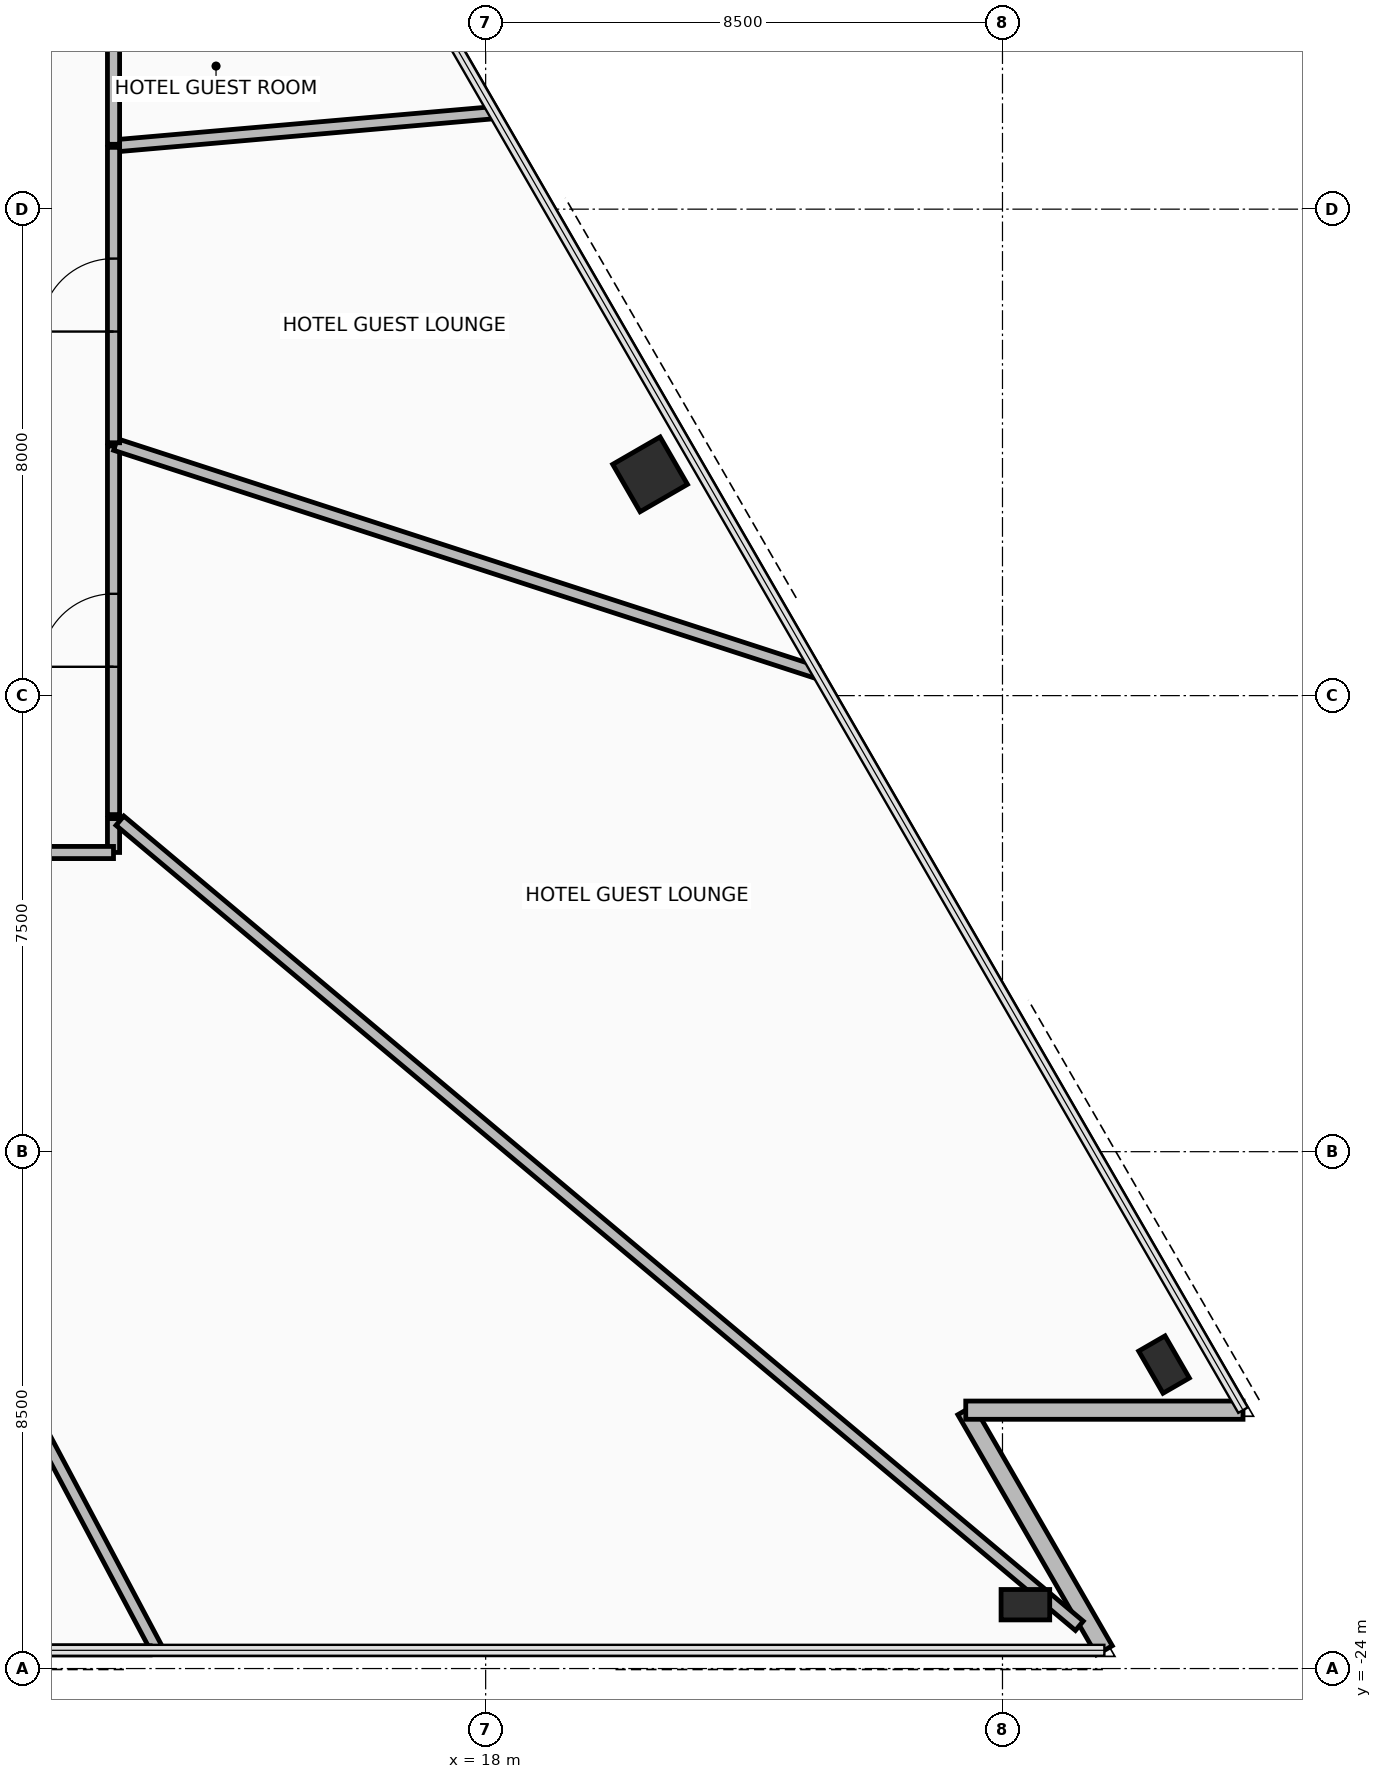
"""IFC4 building model, lengths in metres.
Left out: names, types, materials, properties, quantities, classifications, styles, units other than length and angle.
Written with IfcOpenShell. Run it as: python <this file> out.ifc"""

import sys

from ifc_helpers import new_model, si_unit, direction, frame, frame_2d, origin, origin_2d, place, context, subcontext, project, spatial, rectangle, hollow_rectangle, extrude, element, fill, save


model = new_model("IFC4")
c1 = context("Model", 3, precision=1e-05, world=origin(), true_north=direction((0.0, 1.0)))
c2 = subcontext(c1, "Body", "Model", "MODEL_VIEW")
j1 = project(units=[si_unit("LENGTHUNIT", "METRE"), si_unit("PLANEANGLEUNIT", "RADIAN")], contexts=[c1])
p1 = place(None, origin())
s1 = spatial("IfcSite", under=j1, at=p1, CompositionType="ELEMENT")
p2 = place(p1, origin())
s2 = spatial("IfcBuilding", under=s1, at=p2, CompositionType="ELEMENT")
p3 = place(p2, frame((0.0, 0.0, 38.65)))
s3 = spatial("IfcBuildingStorey", under=s2, at=p3, CompositionType="ELEMENT", Elevation=38.65)
for number, where, z_axis, x_axis in (
    (1, (26.877, -22.95, 0.0), (0.0, 0.0, 1.0), (1.0, 0.0, 0.0)),
    (2, (29.157, -19.001, 0.0), (0.0, 0.0, 1.0), (-0.5, 0.866, 0.0)),
):
    element("IfcColumn", number, at=place(p3, frame(where, z_axis=z_axis, x_axis=x_axis)), inside=s3, PredefinedType="COLUMN", context=c2, shape_type="SweptSolid", body=[
        extrude(hollow_rectangle(XDim=0.5, YDim=0.8, WallThickness=0.04, at=origin_2d()), origin(), (0.0, 0.0, 1.0), 3.4),
    ])
p4 = place(p3, frame((20.705, -4.361, 0.0), z_axis=(0.0, 0.0, 1.0), x_axis=(-0.500001511499, 0.866024531118, 0.0)))
e3 = element("IfcColumn", 3, at=p4, inside=s3, PredefinedType="COLUMN", context=c2, shape_type="SweptSolid", body=[
    extrude(hollow_rectangle(XDim=0.9, YDim=0.9, WallThickness=0.05, at=origin_2d()), origin(), (0.0, 0.0, 1.0), 3.4),
])
p5 = place(p3, frame((28.176, -23.7, 0.0), z_axis=(0.0, 0.0, 1.0), x_axis=(-0.500014431597, 0.866017071537, 0.0)))
e4 = element("IfcWall", 4, at=p5, inside=s3, PredefinedType="STANDARD", context=c2, shape_type="SweptSolid", body=[
    extrude(rectangle(XDim=4.56, YDim=0.3, at=frame_2d((2.28, 0.0))), origin(), (0.0, 0.0, 1.0), 2.42),
])
p6 = place(p3, frame((25.896, -19.751, 0.0), z_axis=(0.0, 0.0, 1.0), x_axis=(1.0, 0.0, 0.0)))
e5 = element("IfcWall", 5, at=p6, inside=s3, PredefinedType="STANDARD", context=c2, shape_type="SweptSolid", body=[
    extrude(rectangle(XDim=4.56, YDim=0.3, at=frame_2d((2.28, 0.0))), origin(), (0.0, 0.0, 1.0), 2.42),
])
p7 = place(p3, frame((7.179, -13.502, 0.0), z_axis=(0.0, 0.0, 1.0), x_axis=(0.469478708188, -0.882943793544, 0.0)))
e6 = element("IfcWall", 6, at=p7, inside=s3, PredefinedType="PARTITIONING", context=c2, shape_type="SweptSolid", body=[
    extrude(rectangle(XDim=11.55, YDim=0.2, at=frame_2d((5.775, 0.0))), origin(), (0.0, 0.0, 1.0), 2.42),
])
p8 = place(p3, frame((12.483, -23.7, 0.0), z_axis=(0.0, 0.0, 1.0), x_axis=(-1.0, 0.0, 0.0)))
e7 = element("IfcWall", 7, at=p8, inside=s3, PredefinedType="PARTITIONING", context=c2, shape_type="SweptSolid", body=[
    extrude(rectangle(XDim=10.386, YDim=0.15, at=frame_2d((5.193, 0.0))), origin(), (0.0, 0.0, 1.0), 3.225),
])
p9 = place(p3, frame((18.136, 1.587, 0.0), z_axis=(0.0, 0.0, 1.0), x_axis=(-0.99619562433, -0.087145155144, 0.0)))
e8 = element("IfcWall", 8, at=p9, inside=s3, PredefinedType="PARTITIONING", context=c2, shape_type="SweptSolid", body=[
    extrude(rectangle(XDim=6.253, YDim=0.2, at=frame_2d((3.126, 0.0))), origin(), (0.0, 0.0, 1.0), 2.42),
])
p10 = place(p3, frame((11.88, 1.067, 0.0), z_axis=(0.0, 0.0, 1.0), x_axis=(0.0, 1.0, 0.0)))
e9 = element("IfcWall", 9, at=p10, inside=s3, PredefinedType="PARTITIONING", context=c2, shape_type="SweptSolid", body=[
    extrude(rectangle(XDim=4.971, YDim=0.2, at=frame_2d((2.486, 0.0))), origin(), (0.0, 0.0, 1.0), 2.82),
])
p11 = place(p10, frame((1.986, 0.0, 0.0)))
e10 = element("IfcOpeningElement", 10, at=p11, cuts=e9, PredefinedType="OPENING", context=c2, shape_type="SweptSolid", body=[
    extrude(rectangle(XDim=1.0, YDim=2.15, at=frame_2d((0.5, 1.075))), frame((0.0, 0.11, 0.0), z_axis=(0.0, -1.0, 0.0), x_axis=(1.0, 0.0, 0.0)), (0.0, 0.0, 1.0), 0.22),
])
p12 = place(p3, frame((11.88, -10.579, 0.0), z_axis=(0.0, 0.0, 1.0), x_axis=(0.0, 1.0, 0.0)))
e11 = element("IfcWall", 11, at=p12, inside=s3, PredefinedType="PARTITIONING", context=c2, shape_type="SweptSolid", body=[
    extrude(rectangle(XDim=0.557, YDim=0.2, at=frame_2d((0.279, 0.0))), origin(), (0.0, 0.0, 1.0), 2.62),
])
p13 = place(p3, frame((11.985, -10.057, 0.0), z_axis=(0.0, 0.0, 1.0), x_axis=(0.766043557541, -0.642788665076, 0.0)))
e12 = element("IfcWall", 12, at=p13, inside=s3, PredefinedType="PARTITIONING", context=c2, shape_type="SweptSolid", body=[
    extrude(rectangle(XDim=20.598, YDim=0.2, at=frame_2d((10.299, 0.0))), origin(), (0.0, 0.0, 1.0), 2.42),
])
p14 = place(p3, frame((8.232, -10.58, 0.0), z_axis=(0.0, 0.0, 1.0), x_axis=(1.0, 0.0, 0.0)))
e13 = element("IfcWall", 13, at=p14, inside=s3, PredefinedType="PARTITIONING", context=c2, shape_type="SweptSolid", body=[
    extrude(rectangle(XDim=3.647, YDim=0.2, at=frame_2d((1.823, 0.0))), origin(), (0.0, 0.0, 1.0), 2.62),
])
p15 = place(p14, frame((1.324, 0.0, 0.0)))
e14 = element("IfcOpeningElement", 14, at=p15, cuts=e13, PredefinedType="OPENING", context=c2, shape_type="SweptSolid", body=[
    extrude(rectangle(XDim=1.0, YDim=2.15, at=frame_2d((0.5, 1.075))), frame((0.0, 0.11, 0.0), z_axis=(0.0, -1.0, 0.0), x_axis=(1.0, 0.0, 0.0)), (0.0, 0.0, 1.0), 0.22),
])
p16 = place(p3, frame((11.88, -9.957, 0.0), z_axis=(0.0, 0.0, 1.0), x_axis=(0.0, 1.0, 0.0)))
e15 = element("IfcWall", 15, at=p16, inside=s3, PredefinedType="PARTITIONING", context=c2, shape_type="SweptSolid", body=[
    extrude(rectangle(XDim=6.062, YDim=0.2, at=frame_2d((3.031, 0.0))), origin(), (0.0, 0.0, 1.0), 2.62),
])
p17 = place(p16, frame((2.431, 0.0, 0.0)))
e16 = element("IfcOpeningElement", 16, at=p17, cuts=e15, PredefinedType="OPENING", context=c2, shape_type="SweptSolid", body=[
    extrude(rectangle(XDim=1.2, YDim=2.15, at=frame_2d((0.6, 1.075))), frame((0.0, 0.11, 0.0), z_axis=(0.0, -1.0, 0.0), x_axis=(1.0, 0.0, 0.0)), (0.0, 0.0, 1.0), 0.22),
])
p18 = place(p3, frame((11.913, -3.871, 0.0), z_axis=(0.0, 0.0, 1.0), x_axis=(0.95105241731, -0.30902960947, 0.0)))
e17 = element("IfcWall", 17, at=p18, inside=s3, PredefinedType="PARTITIONING", context=c2, shape_type="SweptSolid", body=[
    extrude(rectangle(XDim=12.124, YDim=0.2, at=frame_2d((6.062, 0.0))), origin(), (0.0, 0.0, 1.0), 2.42),
])
p19 = place(p3, frame((11.88, -3.842, 0.0), z_axis=(0.0, 0.0, 1.0), x_axis=(0.0, 1.0, 0.0)))
e18 = element("IfcWall", 18, at=p19, inside=s3, PredefinedType="PARTITIONING", context=c2, shape_type="SweptSolid", body=[
    extrude(rectangle(XDim=4.858, YDim=0.2, at=frame_2d((2.429, 0.0))), origin(), (0.0, 0.0, 1.0), 3.225),
])
p20 = place(p19, frame((1.829, 0.0, 0.0)))
e19 = element("IfcOpeningElement", 19, at=p20, cuts=e18, PredefinedType="OPENING", context=c2, shape_type="SweptSolid", body=[
    extrude(rectangle(XDim=1.2, YDim=2.15, at=frame_2d((0.6, 1.075))), frame((0.0, 0.11, 0.0), z_axis=(0.0, -1.0, 0.0), x_axis=(1.0, 0.0, 0.0)), (0.0, 0.0, 1.0), 0.22),
])
p21 = place(p17, origin())
e20 = element("IfcDoor", 20, at=p21, inside=s3, OperationType="SINGLE_SWING_LEFT", PredefinedType="DOOR", context=c2, shape_type="SweptSolid", body=[
    extrude(rectangle(XDim=1.2, YDim=2.15, at=frame_2d((0.6, 1.075))), frame((0.0, 0.025, 0.0), z_axis=(0.0, -1.0, 0.0), x_axis=(1.0, 0.0, 0.0)), (0.0, 0.0, 1.0), 0.05),
])
fill(e16, e20)
p22 = place(p20, origin())
e21 = element("IfcDoor", 21, at=p22, inside=s3, OperationType="SINGLE_SWING_LEFT", PredefinedType="DOOR", context=c2, shape_type="SweptSolid", body=[
    extrude(rectangle(XDim=1.2, YDim=2.15, at=frame_2d((0.6, 1.075))), frame((0.0, 0.025, 0.0), z_axis=(0.0, -1.0, 0.0), x_axis=(1.0, 0.0, 0.0)), (0.0, 0.0, 1.0), 0.05),
])
fill(e19, e21)
save(model, sys.argv[1])
